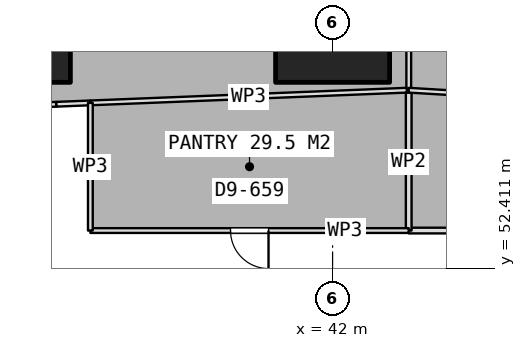
"""IFC4 building model, lengths in metres.
Left out: names, types, materials, properties, quantities, classifications, styles, units other than length and angle.
Written with IfcOpenShell. Run it as: python <this file> out.ifc"""

import sys

from ifc_helpers import new_model, si_unit, direction, frame, frame_2d, origin, origin_2d, place, context, subcontext, project, spatial, rectangle, extrude, element, fill, save


model = new_model("IFC4")
c1 = context("Model", 3, precision=1e-05, world=origin(), true_north=direction((0.0, 1.0)))
c2 = subcontext(c1, "Body", "Model", "MODEL_VIEW")
j1 = project(units=[si_unit("LENGTHUNIT", "METRE"), si_unit("PLANEANGLEUNIT", "RADIAN")], contexts=[c1])
p1 = place(None, origin())
s1 = spatial("IfcSite", under=j1, at=p1, CompositionType="ELEMENT")
p2 = place(p1, origin())
s2 = spatial("IfcBuilding", under=s1, at=p2, CompositionType="ELEMENT")
p3 = place(p2, frame((0.0, 0.0, 159.05)))
s3 = spatial("IfcBuildingStorey", under=s2, at=p3, CompositionType="ELEMENT", Elevation=159.05)
for number, where, z_axis, x_axis in (
    (1, (33.6, 58.8, 0.0), (0.0, 0.0, 1.0), (1.0, 0.0, 0.0)),
    (2, (42.0, 58.8, 0.0), (0.0, 0.0, 1.0), (1.0, 0.0, 0.0)),
):
    element("IfcColumn", number, at=place(p3, frame(where, z_axis=z_axis, x_axis=x_axis)), inside=s3, PredefinedType="COLUMN", context=c2, shape_type="SweptSolid", body=[
        extrude(rectangle(XDim=3.0, YDim=3.0, at=origin_2d()), origin(), (0.0, 0.0, 1.0), 3.75),
    ])
p4 = place(p3, frame((52.35, 56.592, 0.0), z_axis=(0.0, 0.0, 1.0), x_axis=(-0.998203378807, 0.059916730045, 0.0)))
e3 = element("IfcWall", 3, at=p4, inside=s3, PredefinedType="PARTITIONING", context=c2, shape_type="SweptSolid", body=[
    extrude(rectangle(XDim=8.361, YDim=0.125, at=frame_2d((4.181, 0.0))), origin(), (0.0, 0.0, 1.0), 3.4),
])
p5 = place(p4, frame((3.681, 0.0, 0.0)))
e4 = element("IfcOpeningElement", 4, at=p5, cuts=e3, PredefinedType="OPENING", context=c2, shape_type="SweptSolid", body=[
    extrude(rectangle(XDim=1.0, YDim=2.1, at=frame_2d((0.5, 1.05))), frame((0.0, 0.073, 0.0), z_axis=(0.0, -1.0, 0.0), x_axis=(1.0, 0.0, 0.0)), (0.0, 0.0, 1.0), 0.145),
])
p6 = place(p3, frame((44.004, 57.093, 0.0), z_axis=(0.0, 0.0, 1.0), x_axis=(0.0, 1.0, 0.0)))
e5 = element("IfcWall", 5, at=p6, inside=s3, PredefinedType="PARTITIONING", context=c2, shape_type="SweptSolid", body=[
    extrude(rectangle(XDim=4.726, YDim=0.125, at=frame_2d((2.363, 0.0))), origin(), (0.0, 0.0, 1.0), 3.4),
])
p7 = place(p3, frame((53.4, 53.4, 0.0), z_axis=(0.0, 0.0, 1.0), x_axis=(-1.0, 0.0, 0.0)))
e6 = element("IfcWall", 6, at=p7, inside=s3, PredefinedType="PARTITIONING", context=c2, shape_type="SweptSolid", body=[
    extrude(rectangle(XDim=9.397, YDim=0.15, at=frame_2d((4.698, 0.0))), origin(), (0.0, 0.0, 1.0), 3.4),
])
p8 = place(p3, frame((44.003, 53.4, 0.0), z_axis=(0.0, 0.0, 1.0), x_axis=(0.0, 1.0, 0.0)))
e7 = element("IfcWall", 7, at=p8, inside=s3, PredefinedType="PARTITIONING", context=c2, shape_type="SweptSolid", body=[
    extrude(rectangle(XDim=3.63, YDim=0.15, at=frame_2d((1.815, 0.0))), origin(), (0.0, 0.0, 1.0), 3.4),
])
p9 = place(p3, frame((43.953, 57.093, 0.0), z_axis=(0.0, 0.0, 1.0), x_axis=(-0.999196600525, -0.040076844915, 0.0)))
e8 = element("IfcWall", 8, at=p9, inside=s3, PredefinedType="PARTITIONING", context=c2, shape_type="SweptSolid", body=[
    extrude(rectangle(XDim=8.333, YDim=0.125, at=frame_2d((4.167, 0.0))), origin(), (0.0, 0.0, 1.0), 3.4),
])
p10 = place(p3, frame((35.626, 56.759, 0.0), z_axis=(0.0, 0.0, 1.0), x_axis=(-0.999194884772, -0.04011959928, 0.0)))
e9 = element("IfcWall", 9, at=p10, inside=s3, PredefinedType="PARTITIONING", context=c2, shape_type="SweptSolid", body=[
    extrude(rectangle(XDim=0.901, YDim=0.125, at=frame_2d((0.45, 0.0))), origin(), (0.0, 0.0, 1.0), 3.4),
])
p11 = place(p3, frame((34.726, 56.723, 0.0), z_axis=(0.0, 0.0, 1.0), x_axis=(-0.999191974856, -0.040192006472, 0.0)))
e10 = element("IfcWall", 10, at=p11, inside=s3, PredefinedType="PARTITIONING", context=c2, shape_type="SweptSolid", body=[
    extrude(rectangle(XDim=0.522, YDim=0.125, at=frame_2d((0.261, 0.0))), origin(), (0.0, 0.0, 1.0), 3.4),
])
p12 = place(p3, frame((44.003, 53.4, 0.0), z_axis=(0.0, 0.0, 1.0), x_axis=(-1.0, 0.0, 0.0)))
e11 = element("IfcWall", 11, at=p12, inside=s3, PredefinedType="PARTITIONING", context=c2, shape_type="SweptSolid", body=[
    extrude(rectangle(XDim=8.377, YDim=0.125, at=frame_2d((4.188, 0.0))), origin(), (0.0, 0.0, 1.0), 3.4),
])
p13 = place(p12, frame((3.689, 0.0, 0.0)))
e12 = element("IfcOpeningElement", 12, at=p13, cuts=e11, PredefinedType="OPENING", context=c2, shape_type="SweptSolid", body=[
    extrude(rectangle(XDim=1.0, YDim=2.1, at=frame_2d((0.5, 1.05))), frame((0.0, 0.073, 0.0), z_axis=(0.0, -1.0, 0.0), x_axis=(1.0, 0.0, 0.0)), (0.0, 0.0, 1.0), 0.145),
])
p14 = place(p3, frame((35.626, 53.4, 0.0), z_axis=(0.0, 0.0, 1.0), x_axis=(0.0, 1.0, 0.0)))
e13 = element("IfcWall", 13, at=p14, inside=s3, PredefinedType="PARTITIONING", context=c2, shape_type="SweptSolid", body=[
    extrude(rectangle(XDim=3.359, YDim=0.125, at=frame_2d((1.68, 0.0))), origin(), (0.0, 0.0, 1.0), 3.4),
])
p15 = place(p13, origin())
e14 = element("IfcDoor", 14, at=p15, inside=s3, OperationType="SINGLE_SWING_LEFT", PredefinedType="DOOR", context=c2, shape_type="SweptSolid", body=[
    extrude(rectangle(XDim=1.0, YDim=2.1, at=frame_2d((0.5, 1.05))), frame((0.0, 0.025, 0.0), z_axis=(0.0, -1.0, 0.0), x_axis=(1.0, 0.0, 0.0)), (0.0, 0.0, 1.0), 0.05),
])
fill(e12, e14)
save(model, sys.argv[1])
